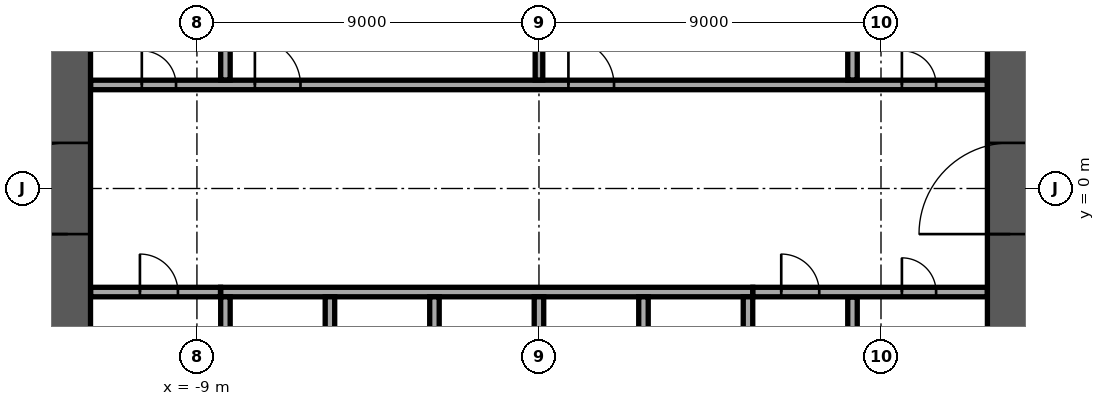
"""IFC4 building model, lengths in metres.
Left out: names, types, materials, properties, quantities, classifications, styles, units other than length and angle.
Written with IfcOpenShell. Run it as: python <this file> out.ifc"""

import sys

from ifc_helpers import new_model, si_unit, direction, frame, frame_2d, origin, place, context, subcontext, project, spatial, rectangle, extrude, element, fill, save


model = new_model("IFC4")
c1 = context("Model", 3, precision=1e-05, world=origin(), true_north=direction((0.0, 1.0)))
c2 = subcontext(c1, "Body", "Model", "MODEL_VIEW")
j1 = project(units=[si_unit("LENGTHUNIT", "METRE"), si_unit("PLANEANGLEUNIT", "RADIAN")], contexts=[c1])
p1 = place(None, origin())
s1 = spatial("IfcSite", under=j1, at=p1, CompositionType="ELEMENT")
p2 = place(p1, origin())
s2 = spatial("IfcBuilding", under=s1, at=p2, CompositionType="ELEMENT")
p3 = place(p2, frame((0.0, 0.0, 9.0)))
s3 = spatial("IfcBuildingStorey", under=s2, at=p3, CompositionType="ELEMENT", Elevation=9.0)
p4 = place(p3, frame((12.4, -11.8, 0.0), z_axis=(0.0, 0.0, 1.0), x_axis=(0.0, 1.0, 0.0)))
e1 = element("IfcWall", 1, at=p4, inside=s3, PredefinedType="SHEAR", context=c2, shape_type="SweptSolid", body=[
    extrude(rectangle(XDim=23.6, YDim=1.2, at=frame_2d((11.8, 0.0))), origin(), (0.0, 0.0, 1.0), 4.1),
])
p5 = place(p4, frame((10.6, 0.0, 0.0)))
e2 = element("IfcOpeningElement", 2, at=p5, cuts=e1, PredefinedType="OPENING", context=c2, shape_type="SweptSolid", body=[
    extrude(rectangle(XDim=2.4, YDim=2.4, at=frame_2d((1.2, 1.2))), frame((0.0, 0.61, 0.0), z_axis=(0.0, -1.0, 0.0), x_axis=(1.0, 0.0, 0.0)), (0.0, 0.0, 1.0), 1.22),
])
p6 = place(p3, frame((-12.4, -11.8, 0.0), z_axis=(0.0, 0.0, 1.0), x_axis=(0.0, 1.0, 0.0)))
e3 = element("IfcWall", 3, at=p6, inside=s3, PredefinedType="SHEAR", context=c2, shape_type="SweptSolid", body=[
    extrude(rectangle(XDim=23.6, YDim=1.2, at=frame_2d((11.8, 0.0))), origin(), (0.0, 0.0, 1.0), 4.1),
])
p7 = place(p6, frame((10.6, 0.0, 0.0)))
e4 = element("IfcOpeningElement", 4, at=p7, cuts=e3, PredefinedType="OPENING", context=c2, shape_type="SweptSolid", body=[
    extrude(rectangle(XDim=2.4, YDim=2.4, at=frame_2d((1.2, 1.2))), frame((0.0, 0.61, 0.0), z_axis=(0.0, -1.0, 0.0), x_axis=(1.0, 0.0, 0.0)), (0.0, 0.0, 1.0), 1.22),
])
p8 = place(p3, frame((-8.375, -2.725, 0.0), z_axis=(0.0, 0.0, 1.0), x_axis=(1.0, 0.0, 0.0)))
e5 = element("IfcWall", 5, at=p8, inside=s3, PredefinedType="SOLIDWALL", context=c2, shape_type="SweptSolid", body=[
    extrude(rectangle(XDim=14.0, YDim=0.25, at=frame_2d((7.0, 0.0))), origin(), (0.0, 0.0, 1.0), 4.1),
])
for number, where, z_axis, x_axis in (
    (6, (-8.25, -5.55, 0.0), (0.0, 0.0, 1.0), (0.0, 1.0, 0.0)),
    (7, (-5.5, -5.55, 0.0), (0.0, 0.0, 1.0), (0.0, 1.0, 0.0)),
    (8, (-2.75, -5.55, 0.0), (0.0, 0.0, 1.0), (0.0, 1.0, 0.0)),
    (9, (0.0, -5.55, 0.0), (0.0, 0.0, 1.0), (0.0, 1.0, 0.0)),
    (10, (2.75, -5.55, 0.0), (0.0, 0.0, 1.0), (0.0, 1.0, 0.0)),
    (11, (5.5, -5.55, 0.0), (0.0, 0.0, 1.0), (0.0, 1.0, 0.0)),
):
    element("IfcWall", number, at=place(p3, frame(where, z_axis=z_axis, x_axis=x_axis)), inside=s3, PredefinedType="SOLIDWALL", context=c2, shape_type="SweptSolid", body=[
        extrude(rectangle(XDim=2.7, YDim=0.25, at=frame_2d((1.35, 0.0))), origin(), (0.0, 0.0, 1.0), 4.1),
    ])
p9 = place(p3, frame((8.25, -5.545, 0.0), z_axis=(0.0, 0.0, 1.0), x_axis=(0.0, 1.0, 0.0)))
e12 = element("IfcWall", 12, at=p9, inside=s3, PredefinedType="PARTITIONING", context=c2, shape_type="SweptSolid", body=[
    extrude(rectangle(XDim=2.69, YDim=0.25, at=frame_2d((1.345, 0.0))), origin(), (0.0, 0.0, 1.0), 4.1),
])
p10 = place(p3, frame((-11.795, -2.725, 0.0), z_axis=(0.0, 0.0, 1.0), x_axis=(1.0, 0.0, 0.0)))
e13 = element("IfcWall", 13, at=p10, inside=s3, PredefinedType="PARTITIONING", context=c2, shape_type="SweptSolid", body=[
    extrude(rectangle(XDim=3.415, YDim=0.25, at=frame_2d((1.708, 0.0))), origin(), (0.0, 0.0, 1.0), 4.1),
])
p11 = place(p10, frame((1.295, 0.0, 0.0)))
e14 = element("IfcOpeningElement", 14, at=p11, cuts=e13, PredefinedType="OPENING", context=c2, shape_type="SweptSolid", body=[
    extrude(rectangle(XDim=1.0, YDim=2.1, at=frame_2d((0.5, 1.05))), frame((0.0, 0.135, 0.0), z_axis=(0.0, -1.0, 0.0), x_axis=(1.0, 0.0, 0.0)), (0.0, 0.0, 1.0), 0.27),
])
p12 = place(p3, frame((5.63, -2.725, 0.0), z_axis=(0.0, 0.0, 1.0), x_axis=(1.0, 0.0, 0.0)))
e15 = element("IfcWall", 15, at=p12, inside=s3, PredefinedType="PARTITIONING", context=c2, shape_type="SweptSolid", body=[
    extrude(rectangle(XDim=6.165, YDim=0.25, at=frame_2d((3.083, 0.0))), origin(), (0.0, 0.0, 1.0), 4.1),
])
p13 = place(p12, frame((0.745, 0.0, 0.0)))
e16 = element("IfcOpeningElement", 16, at=p13, cuts=e15, PredefinedType="OPENING", context=c2, shape_type="SweptSolid", body=[
    extrude(rectangle(XDim=1.0, YDim=2.1, at=frame_2d((0.5, 1.05))), frame((0.0, 0.135, 0.0), z_axis=(0.0, -1.0, 0.0), x_axis=(1.0, 0.0, 0.0)), (0.0, 0.0, 1.0), 0.27),
])
p14 = place(p12, frame((3.92, 0.0, 0.0)))
e17 = element("IfcOpeningElement", 17, at=p14, cuts=e15, PredefinedType="OPENING", context=c2, shape_type="SweptSolid", body=[
    extrude(rectangle(XDim=0.9, YDim=2.1, at=frame_2d((0.45, 1.05))), frame((0.0, 0.135, 0.0), z_axis=(0.0, -1.0, 0.0), x_axis=(1.0, 0.0, 0.0)), (0.0, 0.0, 1.0), 0.27),
])
p15 = place(p3, frame((-11.795, 2.725, 0.0), z_axis=(0.0, 0.0, 1.0), x_axis=(1.0, 0.0, 0.0)))
e18 = element("IfcWall", 18, at=p15, inside=s3, PredefinedType="PARTITIONING", context=c2, shape_type="SweptSolid", body=[
    extrude(rectangle(XDim=23.59, YDim=0.25, at=frame_2d((11.795, 0.0))), origin(), (0.0, 0.0, 1.0), 4.1),
])
p16 = place(p15, frame((21.345, 0.0, 0.0)))
e19 = element("IfcOpeningElement", 19, at=p16, cuts=e18, PredefinedType="OPENING", context=c2, shape_type="SweptSolid", body=[
    extrude(rectangle(XDim=0.9, YDim=2.1, at=frame_2d((0.45, 1.05))), frame((0.0, 0.135, 0.0), z_axis=(0.0, -1.0, 0.0), x_axis=(1.0, 0.0, 0.0)), (0.0, 0.0, 1.0), 0.27),
])
p17 = place(p15, frame((1.345, 0.0, 0.0)))
e20 = element("IfcOpeningElement", 20, at=p17, cuts=e18, PredefinedType="OPENING", context=c2, shape_type="SweptSolid", body=[
    extrude(rectangle(XDim=0.9, YDim=2.1, at=frame_2d((0.45, 1.05))), frame((0.0, 0.135, 0.0), z_axis=(0.0, -1.0, 0.0), x_axis=(1.0, 0.0, 0.0)), (0.0, 0.0, 1.0), 0.27),
])
p18 = place(p15, frame((4.32, 0.0, 0.0)))
e21 = element("IfcOpeningElement", 21, at=p18, cuts=e18, PredefinedType="OPENING", context=c2, shape_type="SweptSolid", body=[
    extrude(rectangle(XDim=1.2, YDim=2.1, at=frame_2d((0.6, 1.05))), frame((0.0, 0.135, 0.0), z_axis=(0.0, -1.0, 0.0), x_axis=(1.0, 0.0, 0.0)), (0.0, 0.0, 1.0), 0.27),
])
p19 = place(p15, frame((12.57, 0.0, 0.0)))
e22 = element("IfcOpeningElement", 22, at=p19, cuts=e18, PredefinedType="OPENING", context=c2, shape_type="SweptSolid", body=[
    extrude(rectangle(XDim=1.2, YDim=2.1, at=frame_2d((0.6, 1.05))), frame((0.0, 0.135, 0.0), z_axis=(0.0, -1.0, 0.0), x_axis=(1.0, 0.0, 0.0)), (0.0, 0.0, 1.0), 0.27),
])
p20 = place(p3, frame((-8.25, 2.855, 0.0), z_axis=(0.0, 0.0, 1.0), x_axis=(0.0, 1.0, 0.0)))
e23 = element("IfcWall", 23, at=p20, inside=s3, PredefinedType="PARTITIONING", context=c2, shape_type="SweptSolid", body=[
    extrude(rectangle(XDim=1.715, YDim=0.25, at=frame_2d((0.857, 0.0))), origin(), (0.0, 0.0, 1.0), 4.1),
])
p21 = place(p3, frame((0.0, 2.855, 0.0), z_axis=(0.0, 0.0, 1.0), x_axis=(0.0, 1.0, 0.0)))
e24 = element("IfcWall", 24, at=p21, inside=s3, PredefinedType="PARTITIONING", context=c2, shape_type="SweptSolid", body=[
    extrude(rectangle(XDim=2.69, YDim=0.2, at=frame_2d((1.345, 0.0))), origin(), (0.0, 0.0, 1.0), 4.1),
])
p22 = place(p3, frame((8.25, 2.855, 0.0), z_axis=(0.0, 0.0, 1.0), x_axis=(0.0, 1.0, 0.0)))
e25 = element("IfcWall", 25, at=p22, inside=s3, PredefinedType="PARTITIONING", context=c2, shape_type="SweptSolid", body=[
    extrude(rectangle(XDim=2.69, YDim=0.25, at=frame_2d((1.345, 0.0))), origin(), (0.0, 0.0, 1.0), 4.1),
])
p23 = place(p5, origin())
e26 = element("IfcDoor", 26, at=p23, inside=s3, OperationType="SINGLE_SWING_LEFT", PredefinedType="DOOR", context=c2, shape_type="SweptSolid", body=[
    extrude(rectangle(XDim=2.4, YDim=2.4, at=frame_2d((1.2, 1.2))), frame((0.0, 0.025, 0.0), z_axis=(0.0, -1.0, 0.0), x_axis=(1.0, 0.0, 0.0)), (0.0, 0.0, 1.0), 0.05),
])
fill(e2, e26)
p24 = place(p7, origin())
e27 = element("IfcDoor", 27, at=p24, inside=s3, OperationType="SINGLE_SWING_LEFT", PredefinedType="DOOR", context=c2, shape_type="SweptSolid", body=[
    extrude(rectangle(XDim=2.4, YDim=2.4, at=frame_2d((1.2, 1.2))), frame((0.0, 0.025, 0.0), z_axis=(0.0, -1.0, 0.0), x_axis=(1.0, 0.0, 0.0)), (0.0, 0.0, 1.0), 0.05),
])
fill(e4, e27)
p25 = place(p11, origin())
e28 = element("IfcDoor", 28, at=p25, inside=s3, OperationType="SINGLE_SWING_LEFT", PredefinedType="DOOR", context=c2, shape_type="SweptSolid", body=[
    extrude(rectangle(XDim=1.0, YDim=2.1, at=frame_2d((0.5, 1.05))), frame((0.0, 0.025, 0.0), z_axis=(0.0, -1.0, 0.0), x_axis=(1.0, 0.0, 0.0)), (0.0, 0.0, 1.0), 0.05),
])
fill(e14, e28)
p26 = place(p13, origin())
e29 = element("IfcDoor", 29, at=p26, inside=s3, OperationType="SINGLE_SWING_LEFT", PredefinedType="DOOR", context=c2, shape_type="SweptSolid", body=[
    extrude(rectangle(XDim=1.0, YDim=2.1, at=frame_2d((0.5, 1.05))), frame((0.0, 0.025, 0.0), z_axis=(0.0, -1.0, 0.0), x_axis=(1.0, 0.0, 0.0)), (0.0, 0.0, 1.0), 0.05),
])
fill(e16, e29)
p27 = place(p16, origin())
e30 = element("IfcDoor", 30, at=p27, inside=s3, OperationType="SINGLE_SWING_LEFT", PredefinedType="DOOR", context=c2, shape_type="SweptSolid", body=[
    extrude(rectangle(XDim=0.9, YDim=2.1, at=frame_2d((0.45, 1.05))), frame((0.0, 0.025, 0.0), z_axis=(0.0, -1.0, 0.0), x_axis=(1.0, 0.0, 0.0)), (0.0, 0.0, 1.0), 0.05),
])
fill(e19, e30)
p28 = place(p14, origin())
e31 = element("IfcDoor", 31, at=p28, inside=s3, OperationType="SINGLE_SWING_LEFT", PredefinedType="DOOR", context=c2, shape_type="SweptSolid", body=[
    extrude(rectangle(XDim=0.9, YDim=2.1, at=frame_2d((0.45, 1.05))), frame((0.0, 0.025, 0.0), z_axis=(0.0, -1.0, 0.0), x_axis=(1.0, 0.0, 0.0)), (0.0, 0.0, 1.0), 0.05),
])
fill(e17, e31)
p29 = place(p17, origin())
e32 = element("IfcDoor", 32, at=p29, inside=s3, OperationType="SINGLE_SWING_LEFT", PredefinedType="DOOR", context=c2, shape_type="SweptSolid", body=[
    extrude(rectangle(XDim=0.9, YDim=2.1, at=frame_2d((0.45, 1.05))), frame((0.0, 0.025, 0.0), z_axis=(0.0, -1.0, 0.0), x_axis=(1.0, 0.0, 0.0)), (0.0, 0.0, 1.0), 0.05),
])
fill(e20, e32)
p30 = place(p18, origin())
e33 = element("IfcDoor", 33, at=p30, inside=s3, OperationType="SINGLE_SWING_LEFT", PredefinedType="DOOR", context=c2, shape_type="SweptSolid", body=[
    extrude(rectangle(XDim=1.2, YDim=2.1, at=frame_2d((0.6, 1.05))), frame((0.0, 0.025, 0.0), z_axis=(0.0, -1.0, 0.0), x_axis=(1.0, 0.0, 0.0)), (0.0, 0.0, 1.0), 0.05),
])
fill(e21, e33)
p31 = place(p19, origin())
e34 = element("IfcDoor", 34, at=p31, inside=s3, OperationType="SINGLE_SWING_LEFT", PredefinedType="DOOR", context=c2, shape_type="SweptSolid", body=[
    extrude(rectangle(XDim=1.2, YDim=2.1, at=frame_2d((0.6, 1.05))), frame((0.0, 0.025, 0.0), z_axis=(0.0, -1.0, 0.0), x_axis=(1.0, 0.0, 0.0)), (0.0, 0.0, 1.0), 0.05),
])
fill(e22, e34)
save(model, sys.argv[1])
